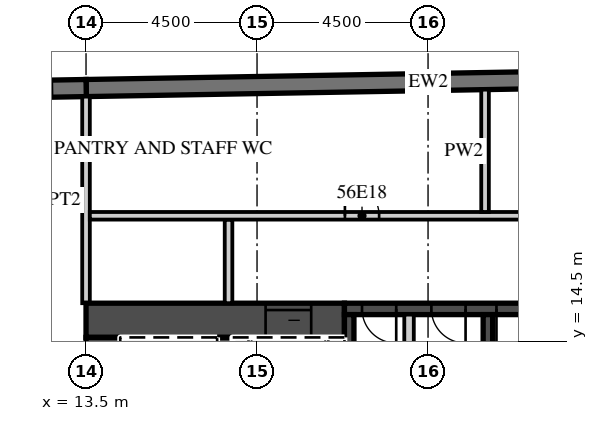
"""IFC4 building model, lengths in metres.
Left out: names, types, materials, properties, quantities, classifications, styles, units other than length and angle.
Written with IfcOpenShell. Run it as: python <this file> out.ifc"""

import sys

from ifc_helpers import new_model, si_unit, direction, frame, frame_2d, origin, place, context, subcontext, project, spatial, rectangle, extrude, element, fill, save


model = new_model("IFC4")
c1 = context("Model", 3, precision=1e-05, world=origin(), true_north=direction((0.0, 1.0)))
c2 = subcontext(c1, "Body", "Model", "MODEL_VIEW")
j1 = project(units=[si_unit("LENGTHUNIT", "METRE"), si_unit("PLANEANGLEUNIT", "RADIAN")], contexts=[c1])
p1 = place(None, origin())
s1 = spatial("IfcSite", under=j1, at=p1, CompositionType="ELEMENT")
p2 = place(p1, origin())
s2 = spatial("IfcBuilding", under=s1, at=p2, CompositionType="ELEMENT")
p3 = place(p2, frame((0.0, 0.0, 230.9)))
s3 = spatial("IfcBuildingStorey", under=s2, at=p3, CompositionType="ELEMENT", Elevation=230.9)
p4 = place(p3, frame((31.504, 21.476, 0.0), z_axis=(0.0, 0.0, 1.0), x_axis=(-0.999847677887, -0.017453395744, 0.0)))
e1 = element("IfcWall", 1, at=p4, inside=s3, PredefinedType="SOLIDWALL", context=c2, shape_type="SweptSolid", body=[
    extrude(rectangle(XDim=18.003, YDim=0.45, at=frame_2d((9.001, 0.0))), origin(), (0.0, 0.0, 1.0), 3.02),
])
p5 = place(p3, frame((13.504, 21.161, 0.0), z_axis=(0.0, 0.0, 1.0), x_axis=(-0.999847763257, -0.017448504532, 0.0)))
e2 = element("IfcWall", 2, at=p5, inside=s3, PredefinedType="SOLIDWALL", context=c2, shape_type="SweptSolid", body=[
    extrude(rectangle(XDim=46.859, YDim=0.45, at=frame_2d((23.43, 0.0))), origin(), (0.0, 0.0, 1.0), 3.02),
])
p6 = place(p5, frame((0.9, 0.0, 0.45)))
e3 = element("IfcOpeningElement", 3, at=p6, cuts=e2, PredefinedType="OPENING", context=c2, shape_type="SweptSolid", body=[
    extrude(rectangle(XDim=2.7, YDim=2.25, at=frame_2d((1.35, 1.125))), frame((0.0, 0.235, 0.0), z_axis=(0.0, -1.0, 0.0), x_axis=(1.0, 0.0, 0.0)), (0.0, 0.0, 1.0), 0.47),
])
p7 = place(p5, frame((5.401, 0.0, 0.45)))
e4 = element("IfcOpeningElement", 4, at=p7, cuts=e2, PredefinedType="OPENING", context=c2, shape_type="SweptSolid", body=[
    extrude(rectangle(XDim=2.7, YDim=2.25, at=frame_2d((1.35, 1.125))), frame((0.0, 0.235, 0.0), z_axis=(0.0, -1.0, 0.0), x_axis=(1.0, 0.0, 0.0)), (0.0, 0.0, 1.0), 0.47),
])
p8 = place(p5, frame((9.902, 0.0, 0.45)))
e5 = element("IfcOpeningElement", 5, at=p8, cuts=e2, PredefinedType="OPENING", context=c2, shape_type="SweptSolid", body=[
    extrude(rectangle(XDim=2.7, YDim=2.25, at=frame_2d((1.35, 1.125))), frame((0.0, 0.235, 0.0), z_axis=(0.0, -1.0, 0.0), x_axis=(1.0, 0.0, 0.0)), (0.0, 0.0, 1.0), 0.47),
])
p9 = place(p5, frame((14.402, 0.0, 0.45)))
e6 = element("IfcOpeningElement", 6, at=p9, cuts=e2, PredefinedType="OPENING", context=c2, shape_type="SweptSolid", body=[
    extrude(rectangle(XDim=2.7, YDim=2.25, at=frame_2d((1.35, 1.125))), frame((0.0, 0.235, 0.0), z_axis=(0.0, -1.0, 0.0), x_axis=(1.0, 0.0, 0.0)), (0.0, 0.0, 1.0), 0.47),
])
p10 = place(p5, frame((18.903, 0.0, 0.45)))
e7 = element("IfcOpeningElement", 7, at=p10, cuts=e2, PredefinedType="OPENING", context=c2, shape_type="SweptSolid", body=[
    extrude(rectangle(XDim=2.7, YDim=2.25, at=frame_2d((1.35, 1.125))), frame((0.0, 0.235, 0.0), z_axis=(0.0, -1.0, 0.0), x_axis=(1.0, 0.0, 0.0)), (0.0, 0.0, 1.0), 0.47),
])
p11 = place(p5, frame((23.404, 0.0, 0.45)))
e8 = element("IfcOpeningElement", 8, at=p11, cuts=e2, PredefinedType="OPENING", context=c2, shape_type="SweptSolid", body=[
    extrude(rectangle(XDim=2.7, YDim=2.25, at=frame_2d((1.35, 1.125))), frame((0.0, 0.235, 0.0), z_axis=(0.0, -1.0, 0.0), x_axis=(1.0, 0.0, 0.0)), (0.0, 0.0, 1.0), 0.47),
])
p12 = place(p5, frame((27.904, 0.0, 0.45)))
e9 = element("IfcOpeningElement", 9, at=p12, cuts=e2, PredefinedType="OPENING", context=c2, shape_type="SweptSolid", body=[
    extrude(rectangle(XDim=2.7, YDim=2.25, at=frame_2d((1.35, 1.125))), frame((0.0, 0.235, 0.0), z_axis=(0.0, -1.0, 0.0), x_axis=(1.0, 0.0, 0.0)), (0.0, 0.0, 1.0), 0.47),
])
p13 = place(p5, frame((32.405, 0.0, 0.45)))
e10 = element("IfcOpeningElement", 10, at=p13, cuts=e2, PredefinedType="OPENING", context=c2, shape_type="SweptSolid", body=[
    extrude(rectangle(XDim=2.7, YDim=2.25, at=frame_2d((1.35, 1.125))), frame((0.0, 0.235, 0.0), z_axis=(0.0, -1.0, 0.0), x_axis=(1.0, 0.0, 0.0)), (0.0, 0.0, 1.0), 0.47),
])
p14 = place(p5, frame((36.906, 0.0, 0.45)))
e11 = element("IfcOpeningElement", 11, at=p14, cuts=e2, PredefinedType="OPENING", context=c2, shape_type="SweptSolid", body=[
    extrude(rectangle(XDim=2.7, YDim=2.25, at=frame_2d((1.35, 1.125))), frame((0.0, 0.235, 0.0), z_axis=(0.0, -1.0, 0.0), x_axis=(1.0, 0.0, 0.0)), (0.0, 0.0, 1.0), 0.47),
])
p15 = place(p5, frame((41.406, 0.0, 0.45)))
e12 = element("IfcOpeningElement", 12, at=p15, cuts=e2, PredefinedType="OPENING", context=c2, shape_type="SweptSolid", body=[
    extrude(rectangle(XDim=2.7, YDim=2.25, at=frame_2d((1.35, 1.125))), frame((0.0, 0.235, 0.0), z_axis=(0.0, -1.0, 0.0), x_axis=(1.0, 0.0, 0.0)), (0.0, 0.0, 1.0), 0.47),
])
p16 = place(p3, frame((13.5, 15.5, 0.0), z_axis=(0.0, 0.0, 1.0), x_axis=(0.0, 1.0, 0.0)))
e13 = element("IfcWall", 13, at=p16, inside=s3, PredefinedType="PARTITIONING", context=c2, shape_type="SweptSolid", body=[
    extrude(rectangle(XDim=5.436, YDim=0.2, at=frame_2d((2.718, 0.0))), origin(), (0.0, 0.0, 1.0), 3.02),
])
p17 = place(p3, frame((13.5, 15.05, 0.0), z_axis=(0.0, 0.0, 1.0), x_axis=(1.0, 0.0, 0.0)))
e14 = element("IfcWall", 14, at=p17, inside=s3, PredefinedType="SHEAR", context=c2, shape_type="SweptSolid", body=[
    extrude(rectangle(XDim=6.8, YDim=0.9, at=frame_2d((3.4, 0.0))), origin(), (0.0, 0.0, 1.0), 3.02),
])
p18 = place(p17, frame((4.725, 0.0, 0.0)))
e15 = element("IfcOpeningElement", 15, at=p18, cuts=e14, PredefinedType="OPENING", context=c2, shape_type="SweptSolid", body=[
    extrude(rectangle(XDim=1.2, YDim=2.1, at=frame_2d((0.6, 1.05))), frame((0.0, 0.46, 0.0), z_axis=(0.0, -1.0, 0.0), x_axis=(1.0, 0.0, 0.0)), (0.0, 0.0, 1.0), 0.92),
])
p19 = place(p3, frame((20.3, 15.35, 0.0), z_axis=(0.0, 0.0, 1.0), x_axis=(1.0, 0.0, 0.0)))
e16 = element("IfcWall", 16, at=p19, inside=s3, PredefinedType="SHEAR", context=c2, shape_type="SweptSolid", body=[
    extrude(rectangle(XDim=10.3, YDim=0.3, at=frame_2d((5.15, 0.0))), origin(), (0.0, 0.0, 1.0), 3.02),
])
p20 = place(p19, frame((4.0, 0.0, 0.0)))
e17 = element("IfcOpeningElement", 17, at=p20, cuts=e16, PredefinedType="OPENING", context=c2, shape_type="SweptSolid", body=[
    extrude(rectangle(XDim=1.3, YDim=2.1, at=frame_2d((0.65, 1.05))), frame((0.0, 0.16, 0.0), z_axis=(0.0, -1.0, 0.0), x_axis=(1.0, 0.0, 0.0)), (0.0, 0.0, 1.0), 0.32),
])
p21 = place(p19, frame((2.288, 0.0, 0.0)))
e18 = element("IfcOpeningElement", 18, at=p21, cuts=e16, PredefinedType="OPENING", context=c2, shape_type="SweptSolid", body=[
    extrude(rectangle(XDim=0.9, YDim=2.1, at=frame_2d((0.45, 1.05))), frame((0.0, 0.16, 0.0), z_axis=(0.0, -1.0, 0.0), x_axis=(1.0, 0.0, 0.0)), (0.0, 0.0, 1.0), 0.32),
])
p22 = place(p19, frame((0.462, 0.0, 0.0)))
e19 = element("IfcOpeningElement", 19, at=p22, cuts=e16, PredefinedType="OPENING", context=c2, shape_type="SweptSolid", body=[
    extrude(rectangle(XDim=0.9, YDim=2.1, at=frame_2d((0.45, 1.05))), frame((0.0, 0.16, 0.0), z_axis=(0.0, -1.0, 0.0), x_axis=(1.0, 0.0, 0.0)), (0.0, 0.0, 1.0), 0.32),
])
p23 = place(p3, frame((13.95, 2.4, 0.0), z_axis=(0.0, 0.0, 1.0), x_axis=(0.0, 1.0, 0.0)))
e20 = element("IfcWall", 20, at=p23, inside=s3, PredefinedType="SHEAR", context=c2, shape_type="SweptSolid", body=[
    extrude(rectangle(XDim=12.2, YDim=0.9, at=frame_2d((6.1, 0.0))), origin(), (0.0, 0.0, 1.0), 3.02),
])
p24 = place(p3, frame((17.15, 8.8, 0.0), z_axis=(0.0, 0.0, 1.0), x_axis=(0.0, 1.0, 0.0)))
e21 = element("IfcWall", 21, at=p24, inside=s3, PredefinedType="SHEAR", context=c2, shape_type="SweptSolid", body=[
    extrude(rectangle(XDim=5.8, YDim=0.4, at=frame_2d((2.9, 0.0))), origin(), (0.0, 0.0, 1.0), 3.02),
])
for number, where, z_axis, x_axis in (
    (22, (20.425, 11.95, 0.0), (0.0, 0.0, 1.0), (0.0, 1.0, 0.0)),
    (23, (24.075, 11.95, 0.0), (0.0, 0.0, 1.0), (0.0, 1.0, 0.0)),
):
    element("IfcWall", number, at=place(p3, frame(where, z_axis=z_axis, x_axis=x_axis)), inside=s3, PredefinedType="SHEAR", context=c2, shape_type="SweptSolid", body=[
        extrude(rectangle(XDim=3.25, YDim=0.25, at=frame_2d((1.625, 0.0))), origin(), (0.0, 0.0, 1.0), 3.02),
    ])
p25 = place(p3, frame((22.0, 11.95, 0.0), z_axis=(0.0, 0.0, 1.0), x_axis=(0.0, 1.0, 0.0)))
e24 = element("IfcWall", 24, at=p25, inside=s3, PredefinedType="PARTITIONING", context=c2, shape_type="SweptSolid", body=[
    extrude(rectangle(XDim=3.25, YDim=0.25, at=frame_2d((1.625, 0.0))), origin(), (0.0, 0.0, 1.0), 3.02),
])
p26 = place(p3, frame((17.25, 15.5, 0.0), z_axis=(0.0, 0.0, 1.0), x_axis=(0.0, 1.0, 0.0)))
e25 = element("IfcWall", 25, at=p26, inside=s3, PredefinedType="PARTITIONING", context=c2, shape_type="SweptSolid", body=[
    extrude(rectangle(XDim=2.2, YDim=0.2, at=frame_2d((1.1, 0.0))), origin(), (0.0, 0.0, 1.0), 3.02),
])
p27 = place(p3, frame((13.6, 17.8, 0.0), z_axis=(0.0, 0.0, 1.0), x_axis=(1.0, 0.0, 0.0)))
e26 = element("IfcWall", 26, at=p27, inside=s3, PredefinedType="PARTITIONING", context=c2, shape_type="SweptSolid", body=[
    extrude(rectangle(XDim=28.657, YDim=0.2, at=frame_2d((14.329, 0.0))), origin(), (0.0, 0.0, 1.0), 3.02),
])
p28 = place(p27, frame((15.012, 0.0, 0.0)))
e27 = element("IfcOpeningElement", 27, at=p28, cuts=e26, PredefinedType="OPENING", context=c2, shape_type="SweptSolid", body=[
    extrude(rectangle(XDim=0.9, YDim=2.1, at=frame_2d((0.45, 1.05))), frame((0.0, 0.11, 0.0), z_axis=(0.0, -1.0, 0.0), x_axis=(1.0, 0.0, 0.0)), (0.0, 0.0, 1.0), 0.22),
])
p29 = place(p27, frame((6.712, 0.0, 0.0)))
e28 = element("IfcOpeningElement", 28, at=p29, cuts=e26, PredefinedType="OPENING", context=c2, shape_type="SweptSolid", body=[
    extrude(rectangle(XDim=0.9, YDim=2.1, at=frame_2d((0.45, 1.05))), frame((0.0, 0.11, 0.0), z_axis=(0.0, -1.0, 0.0), x_axis=(1.0, 0.0, 0.0)), (0.0, 0.0, 1.0), 0.22),
])
p30 = place(p3, frame((24.0, 17.9, 0.0), z_axis=(0.0, 0.0, 1.0), x_axis=(0.0, 1.0, 0.0)))
e29 = element("IfcWall", 29, at=p30, inside=s3, PredefinedType="PARTITIONING", context=c2, shape_type="SweptSolid", body=[
    extrude(rectangle(XDim=3.22, YDim=0.2, at=frame_2d((1.61, 0.0))), origin(), (0.0, 0.0, 1.0), 3.02),
])
p31 = place(p6, origin())
e30 = element("IfcWindow", 30, at=p31, inside=s3, PartitioningType="SINGLE_PANEL", PredefinedType="WINDOW", context=c2, shape_type="SweptSolid", body=[
    extrude(rectangle(XDim=2.7, YDim=2.25, at=frame_2d((1.35, 1.125))), frame((0.0, 0.09, 0.0), z_axis=(0.0, -1.0, 0.0), x_axis=(1.0, 0.0, 0.0)), (0.0, 0.0, 1.0), 0.06),
])
fill(e3, e30)
p32 = place(p18, origin())
e31 = element("IfcDoor", 31, at=p32, inside=s3, OperationType="SLIDING_TO_LEFT", PredefinedType="DOOR", context=c2, shape_type="SweptSolid", body=[
    extrude(rectangle(XDim=1.2, YDim=2.1, at=frame_2d((0.6, 1.05))), frame((0.0, 0.025, 0.0), z_axis=(0.0, -1.0, 0.0), x_axis=(1.0, 0.0, 0.0)), (0.0, 0.0, 1.0), 0.05),
])
fill(e15, e31)
p33 = place(p20, origin())
e32 = element("IfcDoor", 32, at=p33, inside=s3, OperationType="SINGLE_SWING_LEFT", PredefinedType="DOOR", context=c2, shape_type="SweptSolid", body=[
    extrude(rectangle(XDim=1.3, YDim=2.1, at=frame_2d((0.65, 1.05))), frame((0.0, 0.025, 0.0), z_axis=(0.0, -1.0, 0.0), x_axis=(1.0, 0.0, 0.0)), (0.0, 0.0, 1.0), 0.05),
])
fill(e17, e32)
p34 = place(p21, origin())
e33 = element("IfcDoor", 33, at=p34, inside=s3, OperationType="SINGLE_SWING_RIGHT", PredefinedType="DOOR", context=c2, shape_type="SweptSolid", body=[
    extrude(rectangle(XDim=0.9, YDim=2.1, at=frame_2d((0.45, 1.05))), frame((0.0, 0.025, 0.0), z_axis=(0.0, -1.0, 0.0), x_axis=(1.0, 0.0, 0.0)), (0.0, 0.0, 1.0), 0.05),
])
fill(e18, e33)
p35 = place(p22, origin())
e34 = element("IfcDoor", 34, at=p35, inside=s3, OperationType="SINGLE_SWING_RIGHT", PredefinedType="DOOR", context=c2, shape_type="SweptSolid", body=[
    extrude(rectangle(XDim=0.9, YDim=2.1, at=frame_2d((0.45, 1.05))), frame((0.0, 0.025, 0.0), z_axis=(0.0, -1.0, 0.0), x_axis=(1.0, 0.0, 0.0)), (0.0, 0.0, 1.0), 0.05),
])
fill(e19, e34)
p36 = place(p29, origin())
e35 = element("IfcDoor", 35, at=p36, inside=s3, OperationType="SINGLE_SWING_LEFT", PredefinedType="DOOR", context=c2, shape_type="SweptSolid", body=[
    extrude(rectangle(XDim=0.9, YDim=2.1, at=frame_2d((0.45, 1.05))), frame((0.0, 0.025, 0.0), z_axis=(0.0, -1.0, 0.0), x_axis=(1.0, 0.0, 0.0)), (0.0, 0.0, 1.0), 0.05),
])
fill(e28, e35)
save(model, sys.argv[1])
